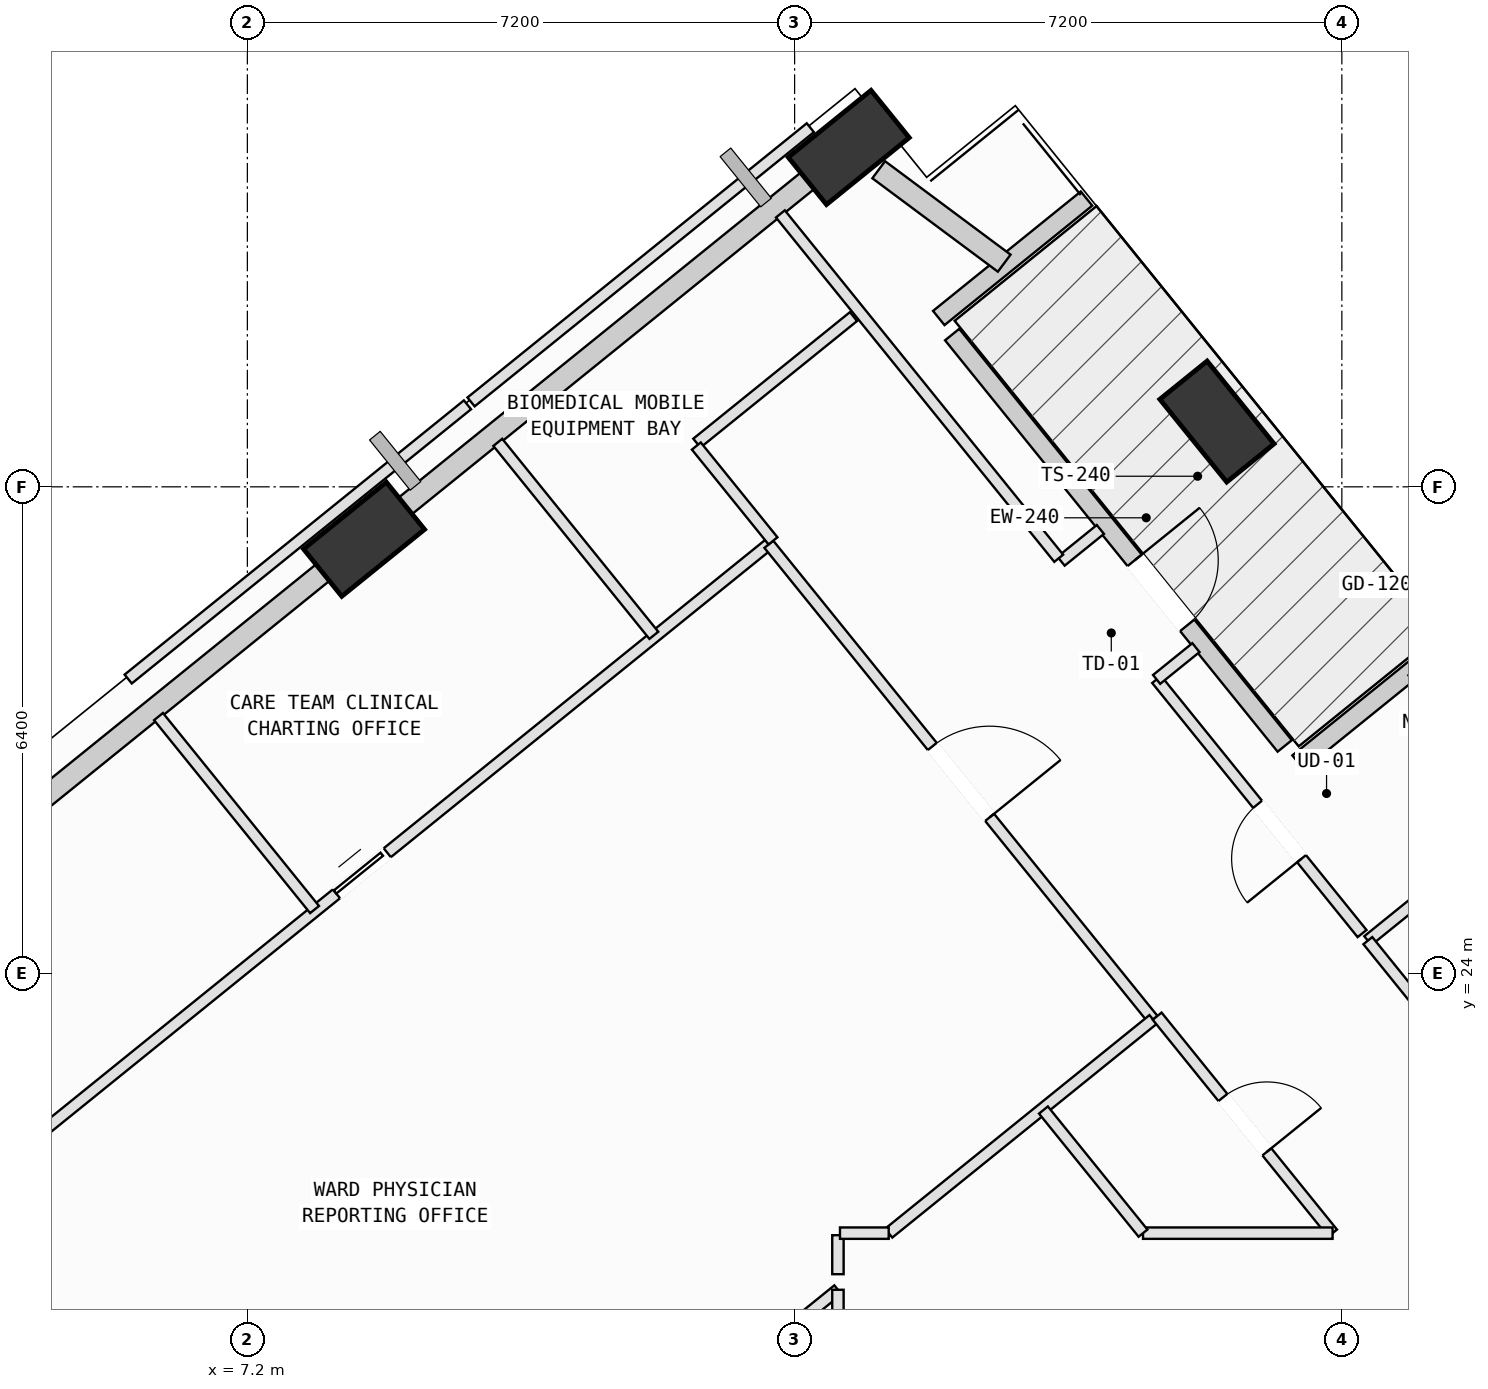
"""IFC4 building model, lengths in metres.
Left out: names, types, materials, properties, quantities, classifications, styles, units other than length and angle.
Written with IfcOpenShell. Run it as: python <this file> out.ifc"""

import sys

from ifc_helpers import new_model, si_unit, direction, frame, frame_2d, origin, origin_2d, place, context, subcontext, project, spatial, rectangle, extrude, element, fill, save


model = new_model("IFC4")
c1 = context("Model", 3, precision=1e-05, world=origin(), true_north=direction((0.0, 1.0)))
c2 = subcontext(c1, "Body", "Model", "MODEL_VIEW")
j1 = project(units=[si_unit("LENGTHUNIT", "METRE"), si_unit("PLANEANGLEUNIT", "RADIAN")], contexts=[c1])
p1 = place(None, origin())
s1 = spatial("IfcSite", under=j1, at=p1, CompositionType="ELEMENT")
p2 = place(p1, origin())
s2 = spatial("IfcBuilding", under=s1, at=p2, CompositionType="ELEMENT")
p3 = place(p2, frame((0.0, 0.0, 189.8)))
s3 = spatial("IfcBuildingStorey", under=s2, at=p3, CompositionType="ELEMENT", Elevation=189.8)
p4 = place(p3, frame((19.957, 31.259, 0.002), z_axis=(-0.026278786715, -0.056703646508, 0.998045150202), x_axis=(-0.244001463205, 0.968556128777, 0.048603614706)))
e1 = element("IfcColumn", 1, at=p4, inside=s3, PredefinedType="COLUMN", context=c2, shape_type="SweptSolid", body=[
    extrude(rectangle(XDim=1.4, YDim=0.8, at=origin_2d()), origin(), (0.0, 0.0, 1.0), 4.004),
])
p5 = place(p3, frame((15.112, 34.865, 0.002), z_axis=(-0.040897879043, -0.076683523206, 0.996216342347), x_axis=(0.980913526392, 0.186611303364, 0.054634011361)))
e2 = element("IfcColumn", 2, at=p5, inside=s3, PredefinedType="COLUMN", context=c2, shape_type="SweptSolid", body=[
    extrude(rectangle(XDim=1.4, YDim=0.8, at=origin_2d()), origin(), (0.0, 0.0, 1.0), 4.011),
])
p6 = place(p3, frame((8.735, 29.71, 0.002), z_axis=(-0.019381494767, -0.102618635304, 0.994531936817), x_axis=(0.880214940794, 0.470012359897, 0.06565089144)))
e3 = element("IfcColumn", 3, at=p6, inside=s3, PredefinedType="COLUMN", context=c2, shape_type="SweptSolid", body=[
    extrude(rectangle(XDim=1.4, YDim=0.8, at=origin_2d()), origin(), (0.0, 0.0, 1.0), 4.018),
])
p7 = place(p3, frame((16.473, 32.403, 0.0), z_axis=(0.0, 0.0, 1.0), x_axis=(0.628648132711, -0.777689864431, 0.0)))
e4 = element("IfcWall", 4, at=p7, inside=s3, PredefinedType="SOLIDWALL", context=c2, shape_type="SweptSolid", body=[
    extrude(rectangle(XDim=6.96, YDim=0.24, at=frame_2d((3.48, 0.0))), origin(), (0.0, 0.0, 1.0), 3.265),
])
p8 = place(p7, frame((3.82, 0.0, 0.0)))
e5 = element("IfcOpeningElement", 5, at=p8, cuts=e4, PredefinedType="OPENING", context=c2, shape_type="SweptSolid", body=[
    extrude(rectangle(XDim=1.1, YDim=2.15, at=frame_2d((0.55, 1.075))), frame((0.0, 0.13, 0.0), z_axis=(0.0, -1.0, 0.0), x_axis=(1.0, 0.0, 0.0)), (0.0, 0.0, 1.0), 0.26),
])
for number, where, z_axis, x_axis in (
    (6, (21.024, 26.773, 0.0), (0.0, 0.0, 1.0), (0.778, 0.629, 0.0)),
    (7, (18.241, 34.193, 0.0), (0.0, 0.0, 1.0), (-0.778, -0.629, 0.0)),
):
    element("IfcWall", number, at=place(p3, frame(where, z_axis=z_axis, x_axis=x_axis)), inside=s3, PredefinedType="SOLIDWALL", context=c2, shape_type="SweptSolid", body=[
        extrude(rectangle(XDim=2.5, YDim=0.24, at=frame_2d((1.25, 0.0))), origin(), (0.0, 0.0, 1.0), 3.265),
    ])
p9 = place(p3, frame((24.207, 26.001, 0.0), z_axis=(0.0, 0.0, 1.0), x_axis=(-0.628643052837, 0.777693970736, 0.0)))
e8 = element("IfcWall", 8, at=p9, inside=s3, PredefinedType="SOLIDWALL", context=c2, shape_type="SweptSolid", body=[
    extrude(rectangle(XDim=2.582, YDim=0.28, at=frame_2d((1.291, 0.0))), origin(), (0.0, 0.0, 1.0), 3.245),
])
p10 = place(p3, frame((15.507, 34.572, 0.0), z_axis=(0.0, 0.0, 1.0), x_axis=(0.802058823744, -0.597245044562, 0.0)))
e9 = element("IfcWall", 9, at=p10, inside=s3, PredefinedType="SOLIDWALL", context=c2, shape_type="SweptSolid", body=[
    extrude(rectangle(XDim=2.059, YDim=0.28, at=frame_2d((1.029, 0.0))), origin(), (0.0, 0.0, 1.0), 3.245),
])
p11 = place(p3, frame((8.982, 29.91, 0.0), z_axis=(0.0, 0.0, 1.0), x_axis=(0.777703078479, 0.628631785487, 0.0)))
e10 = element("IfcWall", 10, at=p11, inside=s3, PredefinedType="SOLIDWALL", context=c2, shape_type="SweptSolid", body=[
    extrude(rectangle(XDim=7.231, YDim=0.28, at=frame_2d((3.615, 0.0))), origin(), (0.0, 0.0, 1.0), 3.265),
])
p12 = place(p3, frame((2.586, 24.74, 0.0), z_axis=(0.0, 0.0, 1.0), x_axis=(0.777703732124, 0.628630976838, 0.0)))
e11 = element("IfcWall", 11, at=p12, inside=s3, PredefinedType="SOLIDWALL", context=c2, shape_type="SweptSolid", body=[
    extrude(rectangle(XDim=7.27, YDim=0.28, at=frame_2d((3.635, 0.0))), origin(), (0.0, 0.0, 1.0), 3.265),
])
p13 = place(p3, frame((7.407, 13.721, 0.0), z_axis=(0.0, 0.0, 1.0), x_axis=(0.777667368678, 0.628675960805, 0.0)))
e12 = element("IfcWall", 12, at=p13, inside=s3, PredefinedType="PARTITIONING", context=c2, shape_type="SweptSolid", body=[
    extrude(rectangle(XDim=9.725, YDim=0.15, at=frame_2d((4.863, 0.0))), origin(), (0.0, 0.0, 1.0), 3.78),
])
p14 = place(p13, frame((4.433, 0.0, 0.0)))
e13 = element("IfcOpeningElement", 13, at=p14, cuts=e12, PredefinedType="OPENING", context=c2, shape_type="SweptSolid", body=[
    extrude(rectangle(XDim=0.86, YDim=2.06, at=frame_2d((0.43, 1.03))), frame((0.0, 0.085, 0.0), z_axis=(0.0, -1.0, 0.0), x_axis=(1.0, 0.0, 0.0)), (0.0, 0.0, 1.0), 0.17),
])
p15 = place(p3, frame((14.97, 19.835, 0.0), z_axis=(0.0, 0.0, 1.0), x_axis=(0.0, -1.0, 0.0)))
e14 = element("IfcWall", 14, at=p15, inside=s3, PredefinedType="PARTITIONING", context=c2, shape_type="SweptSolid", body=[
    extrude(rectangle(XDim=1.605, YDim=0.15, at=frame_2d((0.802, 0.0))), origin(), (0.0, 0.0, 1.0), 3.78),
])
p16 = place(p3, frame((14.97, 20.553, 0.0), z_axis=(0.0, 0.0, 1.0), x_axis=(0.0, -1.0, 0.0)))
e15 = element("IfcWall", 15, at=p16, inside=s3, PredefinedType="PARTITIONING", context=c2, shape_type="SweptSolid", body=[
    extrude(rectangle(XDim=0.513, YDim=0.15, at=frame_2d((0.256, 0.0))), origin(), (0.0, 0.0, 1.0), 3.78),
])
p17 = place(p3, frame((2.739, 20.491, 0.0), z_axis=(0.0, 0.0, 1.0), x_axis=(0.777660203735, 0.628684823681, 0.0)))
e16 = element("IfcWall", 16, at=p17, inside=s3, PredefinedType="PARTITIONING", context=c2, shape_type="SweptSolid", body=[
    extrude(rectangle(XDim=14.559, YDim=0.15, at=frame_2d((7.28, 0.0))), origin(), (0.0, 0.0, 1.0), 3.78),
])
p18 = place(p17, frame((7.244, 0.0, 0.0)))
e17 = element("IfcOpeningElement", 17, at=p18, cuts=e16, PredefinedType="OPENING", context=c2, shape_type="SweptSolid", body=[
    extrude(rectangle(XDim=0.86, YDim=2.06, at=frame_2d((0.43, 1.03))), frame((0.0, 0.085, 0.0), z_axis=(0.0, -1.0, 0.0), x_axis=(1.0, 0.0, 0.0)), (0.0, 0.0, 1.0), 0.17),
])
p19 = place(p3, frame((14.061, 29.644, 0.0), z_axis=(0.0, 0.0, 1.0), x_axis=(0.628674878408, -0.777668243699, 0.0)))
e18 = element("IfcWall", 18, at=p19, inside=s3, PredefinedType="PARTITIONING", context=c2, shape_type="SweptSolid", body=[
    extrude(rectangle(XDim=8.041, YDim=0.15, at=frame_2d((4.02, 0.0))), origin(), (0.0, 0.0, 1.0), 3.78),
])
p20 = place(p19, frame((3.42, 0.0, 0.0)))
e19 = element("IfcOpeningElement", 19, at=p20, cuts=e18, PredefinedType="OPENING", context=c2, shape_type="SweptSolid", body=[
    extrude(rectangle(XDim=1.2, YDim=2.15, at=frame_2d((0.6, 1.075))), frame((0.0, 0.085, 0.0), z_axis=(0.0, -1.0, 0.0), x_axis=(1.0, 0.0, 0.0)), (0.0, 0.0, 1.0), 0.17),
])
p21 = place(p3, frame((19.116, 23.391, 0.0), z_axis=(0.0, 0.0, 1.0), x_axis=(-0.777737917083, -0.628588682949, 0.0)))
e20 = element("IfcWall", 20, at=p21, inside=s3, PredefinedType="PARTITIONING", context=c2, shape_type="SweptSolid", body=[
    extrude(rectangle(XDim=4.472, YDim=0.15, at=frame_2d((2.236, 0.0))), origin(), (0.0, 0.0, 1.0), 3.78),
])
p22 = place(p3, frame((15.638, 20.58, 0.0), z_axis=(0.0, 0.0, 1.0), x_axis=(-1.0, 0.0, 0.0)))
e21 = element("IfcWall", 21, at=p22, inside=s3, PredefinedType="PARTITIONING", context=c2, shape_type="SweptSolid", body=[
    extrude(rectangle(XDim=0.641, YDim=0.15, at=frame_2d((0.32, 0.0))), origin(), (0.0, 0.0, 1.0), 3.78),
])
p23 = place(p3, frame((21.942, 24.429, 0.0), z_axis=(0.0, 0.0, 1.0), x_axis=(0.777758218132, 0.628563564111, 0.0)))
e22 = element("IfcWall", 22, at=p23, inside=s3, PredefinedType="PARTITIONING", context=c2, shape_type="SweptSolid", body=[
    extrude(rectangle(XDim=2.635, YDim=0.15, at=frame_2d((1.317, 0.0))), origin(), (0.0, 0.0, 1.0), 3.78),
])
p24 = place(p3, frame((24.947, 20.711, 0.0), z_axis=(0.0, 0.0, 1.0), x_axis=(-0.628604529082, 0.777725109545, 0.0)))
e23 = element("IfcWall", 23, at=p24, inside=s3, PredefinedType="PARTITIONING", context=c2, shape_type="SweptSolid", body=[
    extrude(rectangle(XDim=4.781, YDim=0.15, at=frame_2d((2.39, 0.0))), origin(), (0.0, 0.0, 1.0), 3.415),
])
p25 = place(p24, frame((1.89, 0.0, 0.0)))
e24 = element("IfcOpeningElement", 24, at=p25, cuts=e23, PredefinedType="OPENING", context=c2, shape_type="SweptSolid", body=[
    extrude(rectangle(XDim=1.0, YDim=2.12, at=frame_2d((0.5, 1.06))), frame((0.0, 0.085, 0.0), z_axis=(0.0, -1.0, 0.0), x_axis=(1.0, 0.0, 0.0)), (0.0, 0.0, 1.0), 0.17),
])
p26 = place(p3, frame((21.866, 24.522, 0.0), z_axis=(0.0, 0.0, 1.0), x_axis=(-0.628613292598, 0.777718026259, 0.0)))
e25 = element("IfcWall", 25, at=p26, inside=s3, PredefinedType="PARTITIONING", context=c2, shape_type="SweptSolid", body=[
    extrude(rectangle(XDim=4.3, YDim=0.15, at=frame_2d((2.15, 0.0))), origin(), (0.0, 0.0, 1.0), 3.78),
])
p27 = place(p26, frame((1.267, 0.0, 0.0)))
e26 = element("IfcOpeningElement", 26, at=p27, cuts=e25, PredefinedType="OPENING", context=c2, shape_type="SweptSolid", body=[
    extrude(rectangle(XDim=0.92, YDim=2.1, at=frame_2d((0.46, 1.05))), frame((0.0, 0.085, 0.0), z_axis=(0.0, -1.0, 0.0), x_axis=(1.0, 0.0, 0.0)), (0.0, 0.0, 1.0), 0.17),
])
p28 = place(p3, frame((19.163, 27.866, 0.0), z_axis=(0.0, 0.0, 1.0), x_axis=(0.777561248939, 0.628807207456, 0.0)))
e27 = element("IfcWall", 27, at=p28, inside=s3, PredefinedType="PARTITIONING", context=c2, shape_type="SweptSolid", body=[
    extrude(rectangle(XDim=0.665, YDim=0.15, at=frame_2d((0.333, 0.0))), origin(), (0.0, 0.0, 1.0), 3.78),
])
p29 = place(p3, frame((18.423, 29.839, 0.0), z_axis=(0.0, 0.0, 1.0), x_axis=(-0.77752690972, -0.628849667776, 0.0)))
e28 = element("IfcWall", 28, at=p29, inside=s3, PredefinedType="PARTITIONING", context=c2, shape_type="SweptSolid", body=[
    extrude(rectangle(XDim=0.665, YDim=0.15, at=frame_2d((0.333, 0.0))), origin(), (0.0, 0.0, 1.0), 3.78),
])
p30 = place(p3, frame((17.875, 29.46, 0.0), z_axis=(0.0, 0.0, 1.0), x_axis=(-0.628591661505, 0.777735509725, 0.0)))
e29 = element("IfcWall", 29, at=p30, inside=s3, PredefinedType="PARTITIONING", context=c2, shape_type="SweptSolid", body=[
    extrude(rectangle(XDim=5.826, YDim=0.15, at=frame_2d((2.913, 0.0))), origin(), (0.0, 0.0, 1.0), 3.78),
])
p31 = place(p3, frame((14.486, 34.603, 0.0), z_axis=(0.0, 0.0, 1.0), x_axis=(0.777608900867, 0.628748278163, 0.0)))
e30 = element("IfcWall", 30, at=p31, inside=s3, PredefinedType="PARTITIONING", context=c2, shape_type="SweptSolid", body=[
    extrude(rectangle(XDim=1.202, YDim=0.15, at=frame_2d((0.601, 0.0))), origin(), (0.0, 0.0, 1.0), 3.265),
])
p32 = place(p3, frame((5.632, 27.871, 0.0), z_axis=(0.0, 0.0, 1.0), x_axis=(0.777730017108, 0.628598457275, 0.0)))
e31 = element("IfcWall", 31, at=p32, inside=s3, PredefinedType="PARTITIONING", context=c2, shape_type="SweptSolid", body=[
    extrude(rectangle(XDim=5.74, YDim=0.15, at=frame_2d((2.87, 0.0))), origin(), (0.0, 0.0, 1.0), 3.78),
])
for number, where, z_axis, x_axis in (
    (32, (10.495, 30.985, 0.0), (0.0, 0.0, 1.0), (0.629, -0.778, 0.0)),
    (33, (8.084, 24.838, 0.0), (0.0, 0.0, 1.0), (-0.629, 0.778, 0.0)),
):
    element("IfcWall", number, at=place(p3, frame(where, z_axis=z_axis, x_axis=x_axis)), inside=s3, PredefinedType="PARTITIONING", context=c2, shape_type="SweptSolid", body=[
        extrude(rectangle(XDim=3.265, YDim=0.15, at=frame_2d((1.633, 0.0))), origin(), (0.0, 0.0, 1.0), 3.78),
    ])
p33 = place(p3, frame((15.175, 32.64, 0.0), z_axis=(0.0, 0.0, 1.0), x_axis=(-0.777920390607, -0.628362845718, 0.0)))
e34 = element("IfcWall", 34, at=p33, inside=s3, PredefinedType="PARTITIONING", context=c2, shape_type="SweptSolid", body=[
    extrude(rectangle(XDim=2.649, YDim=0.15, at=frame_2d((1.325, 0.0))), origin(), (0.0, 0.0, 1.0), 3.78),
])
p34 = place(p3, frame((13.107, 30.937, 0.0), z_axis=(0.0, 0.0, 1.0), x_axis=(0.628712363402, -0.777637938957, 0.0)))
e35 = element("IfcWall", 35, at=p34, inside=s3, PredefinedType="PARTITIONING", context=c2, shape_type="SweptSolid", body=[
    extrude(rectangle(XDim=1.605, YDim=0.15, at=frame_2d((0.802, 0.0))), origin(), (0.0, 0.0, 1.0), 3.78),
])
p35 = place(p3, frame((19.17, 23.435, 0.0), z_axis=(0.0, 0.0, 1.0), x_axis=(0.62869305857, -0.777653546321, 0.0)))
e36 = element("IfcWall", 36, at=p35, inside=s3, PredefinedType="PARTITIONING", context=c2, shape_type="SweptSolid", body=[
    extrude(rectangle(XDim=3.671, YDim=0.15, at=frame_2d((1.836, 0.0))), origin(), (0.0, 0.0, 1.0), 3.78),
])
p36 = place(p35, frame((1.375, 0.0, 0.0)))
e37 = element("IfcOpeningElement", 37, at=p36, cuts=e36, PredefinedType="OPENING", context=c2, shape_type="SweptSolid", body=[
    extrude(rectangle(XDim=0.92, YDim=2.1, at=frame_2d((0.46, 1.05))), frame((0.0, 0.085, 0.0), z_axis=(0.0, -1.0, 0.0), x_axis=(1.0, 0.0, 0.0)), (0.0, 0.0, 1.0), 0.17),
])
p37 = place(p3, frame((21.478, 20.58, 0.0), z_axis=(0.0, 0.0, 1.0), x_axis=(-1.0, 0.0, 0.0)))
e38 = element("IfcWall", 38, at=p37, inside=s3, PredefinedType="PARTITIONING", context=c2, shape_type="SweptSolid", body=[
    extrude(rectangle(XDim=2.494, YDim=0.15, at=frame_2d((1.247, 0.0))), origin(), (0.0, 0.0, 1.0), 3.78),
])
p38 = place(p3, frame((18.984, 20.58, 0.0), z_axis=(0.0, 0.0, 1.0), x_axis=(-0.628759845398, 0.777599547849, 0.0)))
e39 = element("IfcWall", 39, at=p38, inside=s3, PredefinedType="PARTITIONING", context=c2, shape_type="SweptSolid", body=[
    extrude(rectangle(XDim=2.083, YDim=0.15, at=frame_2d((1.042, 0.0))), origin(), (0.0, 0.0, 1.0), 3.78),
])
p39 = place(p3, frame((10.143, 31.517, 0.0), z_axis=(0.0, 0.0, 1.0), x_axis=(0.777730017108, 0.628598457275, 0.0)))
e40 = element("IfcWall", 40, at=p39, inside=s3, PredefinedType="PARTITIONING", context=c2, shape_type="SweptSolid", body=[
    extrude(rectangle(XDim=5.74, YDim=0.15, at=frame_2d((2.87, 0.0))), origin(), (0.0, 0.0, 1.0), 3.78),
])
p40 = place(p8, origin())
e41 = element("IfcDoor", 41, at=p40, inside=s3, OperationType="SINGLE_SWING_LEFT", PredefinedType="DOOR", context=c2, shape_type="SweptSolid", body=[
    extrude(rectangle(XDim=1.1, YDim=2.15, at=frame_2d((0.55, 1.075))), frame((0.0, 0.025, 0.0), z_axis=(0.0, -1.0, 0.0), x_axis=(1.0, 0.0, 0.0)), (0.0, 0.0, 1.0), 0.05),
])
fill(e5, e41)
p41 = place(p20, origin())
e42 = element("IfcDoor", 42, at=p41, inside=s3, OperationType="SINGLE_SWING_RIGHT", PredefinedType="DOOR", context=c2, shape_type="SweptSolid", body=[
    extrude(rectangle(XDim=1.2, YDim=2.15, at=frame_2d((0.6, 1.075))), frame((0.0, 0.025, 0.0), z_axis=(0.0, -1.0, 0.0), x_axis=(1.0, 0.0, 0.0)), (0.0, 0.0, 1.0), 0.05),
])
fill(e19, e42)
p42 = place(p27, origin())
e43 = element("IfcDoor", 43, at=p42, inside=s3, OperationType="SINGLE_SWING_LEFT", PredefinedType="DOOR", context=c2, shape_type="SweptSolid", body=[
    extrude(rectangle(XDim=0.92, YDim=2.1, at=frame_2d((0.46, 1.05))), frame((0.0, 0.025, 0.0), z_axis=(0.0, -1.0, 0.0), x_axis=(1.0, 0.0, 0.0)), (0.0, 0.0, 1.0), 0.05),
])
fill(e26, e43)
p43 = place(p36, origin())
e44 = element("IfcDoor", 44, at=p43, inside=s3, OperationType="SINGLE_SWING_RIGHT", PredefinedType="DOOR", context=c2, shape_type="SweptSolid", body=[
    extrude(rectangle(XDim=0.92, YDim=2.1, at=frame_2d((0.46, 1.05))), frame((0.0, 0.025, 0.0), z_axis=(0.0, -1.0, 0.0), x_axis=(1.0, 0.0, 0.0)), (0.0, 0.0, 1.0), 0.05),
])
fill(e37, e44)
p44 = place(p18, origin())
e45 = element("IfcDoor", 45, at=p44, inside=s3, OperationType="SLIDING_TO_LEFT", PredefinedType="DOOR", context=c2, shape_type="SweptSolid", body=[
    extrude(rectangle(XDim=0.86, YDim=2.06, at=frame_2d((0.43, 1.03))), frame((0.0, 0.025, 0.0), z_axis=(0.0, -1.0, 0.0), x_axis=(1.0, 0.0, 0.0)), (0.0, 0.0, 1.0), 0.05),
])
fill(e17, e45)
save(model, sys.argv[1])
